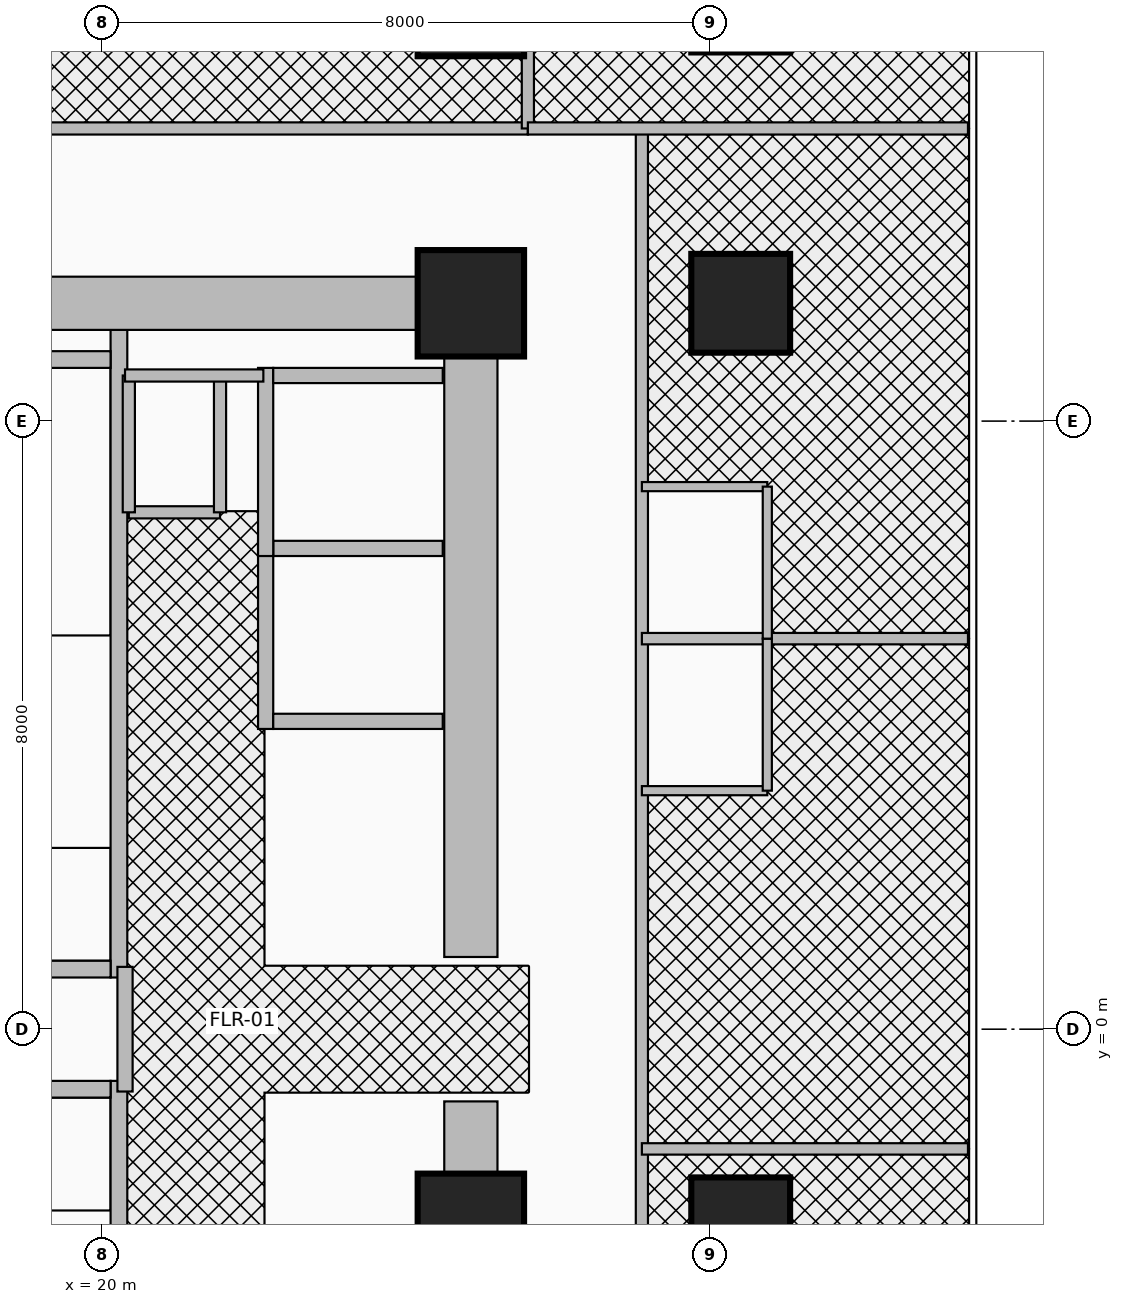
"""IFC4 building model, lengths in metres.
Left out: names, types, materials, properties, quantities, classifications, styles, units other than length and angle.
Written with IfcOpenShell. Run it as: python <this file> out.ifc"""

import sys

from ifc_helpers import new_model, si_unit, direction, frame, frame_2d, origin, origin_2d, place, context, subcontext, project, spatial, rectangle, circle, extrude, source, transform, mapped, element, fill, save


model = new_model("IFC4")
c1 = context("Model", 3, precision=1e-05, world=origin(), true_north=direction((0.0, 1.0)))
c2 = subcontext(c1, "Body", "Model", "MODEL_VIEW")
j1 = project(units=[si_unit("LENGTHUNIT", "METRE"), si_unit("PLANEANGLEUNIT", "RADIAN")], contexts=[c1])
p1 = place(None, origin())
s1 = spatial("IfcSite", under=j1, at=p1, CompositionType="ELEMENT")
p2 = place(p1, origin())
s2 = spatial("IfcBuilding", under=s1, at=p2, CompositionType="ELEMENT")
p3 = place(p2, frame((0.0, 0.0, 70.4)))
s3 = spatial("IfcBuildingStorey", under=s2, at=p3, CompositionType="ELEMENT", Elevation=70.4)
p4 = place(p3, frame((20.22, 0.68, 0.0), z_axis=(0.0, 0.0, 1.0), x_axis=(0.0, 1.0, 0.0)))
e1 = element("IfcWall", 1, at=p4, inside=s3, PredefinedType="SHEAR", context=c2, shape_type="SweptSolid", body=[
    extrude(rectangle(XDim=8.52, YDim=0.22, at=frame_2d((4.26, 0.0))), origin(), (0.0, 0.0, 1.0), 3.46),
])
p5 = place(p3, frame((17.0, 0.79, 0.0), z_axis=(0.0, 0.0, 1.0), x_axis=(1.0, 0.0, 0.0)))
e2 = element("IfcWall", 2, at=p5, inside=s3, PredefinedType="SHEAR", context=c2, shape_type="SweptSolid", body=[
    extrude(rectangle(XDim=3.11, YDim=0.22, at=frame_2d((1.555, 0.0))), origin(), (0.0, 0.0, 1.0), 3.46),
])
p6 = place(p5, frame((0.95, 0.0, 0.0)))
e3 = element("IfcOpeningElement", 3, at=p6, cuts=e2, PredefinedType="OPENING", context=c2, shape_type="SweptSolid", body=[
    extrude(rectangle(XDim=1.1, YDim=2.15, at=frame_2d((0.55, 1.075))), frame((0.0, 0.125, 0.0), z_axis=(0.0, -1.0, 0.0), x_axis=(1.0, 0.0, 0.0)), (0.0, 0.0, 1.0), 0.25),
])
p7 = place(p3, frame((17.0, 8.81, 0.0), z_axis=(0.0, 0.0, 1.0), x_axis=(1.0, 0.0, 0.0)))
e4 = element("IfcWall", 4, at=p7, inside=s3, PredefinedType="SHEAR", context=c2, shape_type="SweptSolid", body=[
    extrude(rectangle(XDim=3.11, YDim=0.22, at=frame_2d((1.555, 0.0))), origin(), (0.0, 0.0, 1.0), 3.46),
])
p8 = place(p3, frame((20.22, -9.2, 0.0), z_axis=(0.0, 0.0, 1.0), x_axis=(0.0, 1.0, 0.0)))
e5 = element("IfcWall", 5, at=p8, inside=s3, PredefinedType="SHEAR", context=c2, shape_type="SweptSolid", body=[
    extrude(rectangle(XDim=8.52, YDim=0.22, at=frame_2d((4.26, 0.0))), origin(), (0.0, 0.0, 1.0), 3.46),
])
p9 = place(p3, frame((17.0, -0.79, 0.0), z_axis=(0.0, 0.0, 1.0), x_axis=(1.0, 0.0, 0.0)))
e6 = element("IfcWall", 6, at=p9, inside=s3, PredefinedType="SHEAR", context=c2, shape_type="SweptSolid", body=[
    extrude(rectangle(XDim=3.11, YDim=0.22, at=frame_2d((1.555, 0.0))), origin(), (0.0, 0.0, 1.0), 3.46),
])
p10 = place(p9, frame((0.95, 0.0, 0.0)))
e7 = element("IfcOpeningElement", 7, at=p10, cuts=e6, PredefinedType="OPENING", context=c2, shape_type="SweptSolid", body=[
    extrude(rectangle(XDim=1.1, YDim=2.15, at=frame_2d((0.55, 1.075))), frame((0.0, 0.125, 0.0), z_axis=(0.0, -1.0, 0.0), x_axis=(1.0, 0.0, 0.0)), (0.0, 0.0, 1.0), 0.25),
])
for number, where, z_axis, x_axis in (
    (8, (24.85, -9.9, 0.0), (0.0, 0.0, 1.0), (0.0, 1.0, 0.0)),
    (9, (24.85, 0.95, 0.0), (0.0, 0.0, 1.0), (0.0, 1.0, 0.0)),
):
    element("IfcWall", number, at=place(p3, frame(where, z_axis=z_axis, x_axis=x_axis)), inside=s3, PredefinedType="SHEAR", context=c2, shape_type="SweptSolid", body=[
        extrude(rectangle(XDim=8.95, YDim=0.7, at=frame_2d((4.475, 0.0))), origin(), (0.0, 0.0, 1.0), 3.46),
    ])
p11 = place(p3, frame((15.85, 9.55, 0.0), z_axis=(0.0, 0.0, 1.0), x_axis=(1.0, 0.0, 0.0)))
e10 = element("IfcWall", 10, at=p11, inside=s3, PredefinedType="SHEAR", context=c2, shape_type="SweptSolid", body=[
    extrude(rectangle(XDim=9.0, YDim=0.7, at=frame_2d((4.5, 0.0))), origin(), (0.0, 0.0, 1.0), 3.46),
])
m1 = source(origin(), c2, "Body", "SweptSolid", [
    extrude(rectangle(XDim=1.4, YDim=1.4, at=origin_2d()), origin(), (0.0, 0.0, 1.0), 3.7),
])
p12 = place(p3, frame((24.85, -2.6, 0.0), z_axis=(0.0, 0.0, 1.0), x_axis=(1.0, 0.0, 0.0)))
e11 = element("IfcColumn", 11, at=p12, inside=s3, PredefinedType="COLUMN", context=c2, shape_type="MappedRepresentation", body=[
    mapped(m1, transform((0.0, 0.0, 0.0), x_axis=(1.0, 0.0, 0.0), y_axis=(0.0, 1.0, 0.0), z_axis=(0.0, 0.0, 1.0), scale=1.0)),
])
m2 = source(origin(), c2, "Body", "SweptSolid", [
    extrude(circle(Radius=0.65, at=origin_2d()), origin(), (0.0, 0.0, 1.0), 3.7),
])
p13 = place(p3, frame((28.4, -2.6, 0.0), z_axis=(0.0, 0.0, 1.0), x_axis=(1.0, 0.0, 0.0)))
e12 = element("IfcColumn", 12, at=p13, inside=s3, PredefinedType="COLUMN", context=c2, shape_type="MappedRepresentation", body=[
    mapped(m2, transform((0.0, 0.0, 0.0), x_axis=(1.0, 0.0, 0.0), y_axis=(0.0, 1.0, 0.0), z_axis=(0.0, 0.0, 1.0), scale=1.0)),
])
p14 = place(p3, frame((24.85, 9.55, 0.0), z_axis=(0.0, 0.0, 1.0), x_axis=(1.0, 0.0, 0.0)))
e13 = element("IfcColumn", 13, at=p14, inside=s3, PredefinedType="COLUMN", context=c2, shape_type="MappedRepresentation", body=[
    mapped(m1, transform((0.0, 0.0, 0.0), x_axis=(1.0, 0.0, 0.0), y_axis=(0.0, 1.0, 0.0), z_axis=(0.0, 0.0, 1.0), scale=1.0)),
])
p15 = place(p3, frame((28.4, 9.55, 0.0), z_axis=(0.0, 0.0, 1.0), x_axis=(1.0, 0.0, 0.0)))
e14 = element("IfcColumn", 14, at=p15, inside=s3, PredefinedType="COLUMN", context=c2, shape_type="MappedRepresentation", body=[
    mapped(m2, transform((0.0, 0.0, 0.0), x_axis=(1.0, 0.0, 0.0), y_axis=(0.0, 1.0, 0.0), z_axis=(0.0, 0.0, 1.0), scale=1.0)),
])
p16 = place(p3, frame((24.85, 13.5, 0.0), z_axis=(0.0, 0.0, 1.0), x_axis=(1.0, 0.0, 0.0)))
e15 = element("IfcColumn", 15, at=p16, inside=s3, PredefinedType="COLUMN", context=c2, shape_type="MappedRepresentation", body=[
    mapped(m1, transform((0.0, 0.0, 0.0), x_axis=(1.0, 0.0, 0.0), y_axis=(0.0, 1.0, 0.0), z_axis=(0.0, 0.0, 1.0), scale=1.0)),
])
p17 = place(p3, frame((22.15, 3.95, 0.0), z_axis=(0.0, 0.0, 1.0), x_axis=(0.0, 1.0, 0.0)))
e16 = element("IfcWall", 16, at=p17, inside=s3, PredefinedType="MOVABLE", context=c2, shape_type="SweptSolid", body=[
    extrude(rectangle(XDim=2.475, YDim=0.2, at=frame_2d((1.238, 0.0))), origin(), (0.0, 0.0, 1.0), 3.46),
])
for number, where, z_axis, x_axis in (
    (17, (22.25, 4.05, 0.0), (0.0, 0.0, 1.0), (1.0, 0.0, 0.0)),
    (18, (22.25, 6.325, 0.0), (0.0, 0.0, 1.0), (1.0, 0.0, 0.0)),
):
    element("IfcWall", number, at=place(p3, frame(where, z_axis=z_axis, x_axis=x_axis)), inside=s3, PredefinedType="MOVABLE", context=c2, shape_type="SweptSolid", body=[
        extrude(rectangle(XDim=2.23, YDim=0.2, at=frame_2d((1.115, 0.0))), origin(), (0.0, 0.0, 1.0), 2.245),
    ])
p18 = place(p3, frame((22.15, 6.225, 0.0), z_axis=(0.0, 0.0, 1.0), x_axis=(0.0, 1.0, 0.0)))
e19 = element("IfcWall", 19, at=p18, inside=s3, PredefinedType="MOVABLE", context=c2, shape_type="SweptSolid", body=[
    extrude(rectangle(XDim=2.475, YDim=0.2, at=frame_2d((1.237, 0.0))), origin(), (0.0, 0.0, 1.0), 3.46),
])
p19 = place(p3, frame((22.25, 8.6, 0.0), z_axis=(0.0, 0.0, 1.0), x_axis=(1.0, 0.0, 0.0)))
e20 = element("IfcWall", 20, at=p19, inside=s3, PredefinedType="MOVABLE", context=c2, shape_type="SweptSolid", body=[
    extrude(rectangle(XDim=2.23, YDim=0.2, at=frame_2d((1.115, 0.0))), origin(), (0.0, 0.0, 1.0), 2.245),
])
p20 = place(p3, frame((20.3, -0.82, 0.0), z_axis=(0.0, 0.0, 1.0), x_axis=(0.0, 1.0, 0.0)))
e21 = element("IfcWall", 21, at=p20, inside=s3, PredefinedType="PARTITIONING", context=c2, shape_type="SweptSolid", body=[
    extrude(rectangle(XDim=1.64, YDim=0.2, at=frame_2d((0.82, 0.0))), origin(), (0.0, 0.0, 1.0), 3.46),
])
p21 = place(p20, frame((0.295, 0.0, 0.0)))
e22 = element("IfcOpeningElement", 22, at=p21, cuts=e21, PredefinedType="OPENING", context=c2, shape_type="SweptSolid", body=[
    extrude(rectangle(XDim=1.05, YDim=2.15, at=frame_2d((0.525, 1.075))), frame((0.0, 0.115, 0.0), z_axis=(0.0, -1.0, 0.0), x_axis=(1.0, 0.0, 0.0)), (0.0, 0.0, 1.0), 0.23),
])
p22 = place(p3, frame((20.35, 6.8, 0.0), z_axis=(0.0, 0.0, 1.0), x_axis=(1.0, 0.0, 0.0)))
e23 = element("IfcWall", 23, at=p22, inside=s3, PredefinedType="PARTITIONING", context=c2, shape_type="SweptSolid", body=[
    extrude(rectangle(XDim=1.2, YDim=0.16, at=frame_2d((0.6, 0.0))), origin(), (0.0, 0.0, 1.0), 3.46),
])
p23 = place(p22, frame((0.175, 0.0, 0.0)))
e24 = element("IfcOpeningElement", 24, at=p23, cuts=e23, PredefinedType="OPENING", context=c2, shape_type="SweptSolid", body=[
    extrude(rectangle(XDim=0.85, YDim=2.05, at=frame_2d((0.425, 1.025))), frame((0.0, 0.095, 0.0), z_axis=(0.0, -1.0, 0.0), x_axis=(1.0, 0.0, 0.0)), (0.0, 0.0, 1.0), 0.19),
])
for number, where, z_axis, x_axis in (
    (25, (21.55, 6.8, 0.0), (0.0, 0.0, 1.0), (0.0, 1.0, 0.0)),
    (26, (20.35, 6.8, 0.0), (0.0, 0.0, 1.0), (0.0, 1.0, 0.0)),
):
    element("IfcWall", number, at=place(p3, frame(where, z_axis=z_axis, x_axis=x_axis)), inside=s3, PredefinedType="PARTITIONING", context=c2, shape_type="SweptSolid", body=[
        extrude(rectangle(XDim=1.8, YDim=0.16, at=frame_2d((0.9, 0.0))), origin(), (0.0, 0.0, 1.0), 3.46),
    ])
p24 = place(p3, frame((20.3, 8.6, 0.0), z_axis=(0.0, 0.0, 1.0), x_axis=(1.0, 0.0, 0.0)))
e27 = element("IfcWall", 27, at=p24, inside=s3, PredefinedType="PARTITIONING", context=c2, shape_type="SweptSolid", body=[
    extrude(rectangle(XDim=1.82, YDim=0.16, at=frame_2d((0.91, 0.0))), origin(), (0.0, 0.0, 1.0), 3.46),
])
p25 = place(p3, frame((15.4, 11.85, 0.0), z_axis=(0.0, 0.0, 1.0), x_axis=(1.0, 0.0, 0.0)))
e28 = element("IfcWall", 28, at=p25, inside=s3, PredefinedType="PARTITIONING", context=c2, shape_type="SweptSolid", body=[
    extrude(rectangle(XDim=10.2, YDim=0.16, at=frame_2d((5.1, 0.0))), origin(), (0.0, 0.0, 1.0), 2.834),
])
p26 = place(p25, frame((4.65, 0.0, 0.0)))
e29 = element("IfcOpeningElement", 29, at=p26, cuts=e28, PredefinedType="OPENING", context=c2, shape_type="SweptSolid", body=[
    extrude(rectangle(XDim=0.9, YDim=2.1, at=frame_2d((0.45, 1.05))), frame((0.0, 0.095, 0.0), z_axis=(0.0, -1.0, 0.0), x_axis=(1.0, 0.0, 0.0)), (0.0, 0.0, 1.0), 0.19),
])
p27 = place(p3, frame((25.6, 11.85, 0.0), z_axis=(0.0, 0.0, 1.0), x_axis=(0.0, 1.0, 0.0)))
e30 = element("IfcWall", 30, at=p27, inside=s3, PredefinedType="PARTITIONING", context=c2, shape_type="SweptSolid", body=[
    extrude(rectangle(XDim=5.898, YDim=0.16, at=frame_2d((2.949, 0.0))), origin(), (0.0, 0.0, 1.0), 2.583),
])
p28 = place(p3, frame((27.1, -13.89, 0.0), z_axis=(0.0, 0.0, 1.0), x_axis=(0.0, 1.0, 0.0)))
e31 = element("IfcWall", 31, at=p28, inside=s3, PredefinedType="PARTITIONING", context=c2, shape_type="SweptSolid", body=[
    extrude(rectangle(XDim=25.74, YDim=0.16, at=frame_2d((12.87, 0.0))), origin(), (0.0, 0.0, 1.0), 2.583),
])
p29 = place(p28, frame((2.62, 0.0, 0.0)))
e32 = element("IfcOpeningElement", 32, at=p29, cuts=e31, PredefinedType="OPENING", context=c2, shape_type="SweptSolid", body=[
    extrude(rectangle(XDim=0.95, YDim=2.15, at=frame_2d((0.475, 1.075))), frame((0.0, 0.095, 0.0), z_axis=(0.0, -1.0, 0.0), x_axis=(1.0, 0.0, 0.0)), (0.0, 0.0, 1.0), 0.19),
])
p30 = place(p28, frame((8.484, 0.0, 0.0)))
e33 = element("IfcOpeningElement", 33, at=p30, cuts=e31, PredefinedType="OPENING", context=c2, shape_type="SweptSolid", body=[
    extrude(rectangle(XDim=0.95, YDim=2.15, at=frame_2d((0.475, 1.075))), frame((0.0, 0.095, 0.0), z_axis=(0.0, -1.0, 0.0), x_axis=(1.0, 0.0, 0.0)), (0.0, 0.0, 1.0), 0.19),
])
p31 = place(p28, frame((14.197, 0.0, 0.0)))
e34 = element("IfcOpeningElement", 34, at=p31, cuts=e31, PredefinedType="OPENING", context=c2, shape_type="SweptSolid", body=[
    extrude(rectangle(XDim=0.95, YDim=2.15, at=frame_2d((0.475, 1.075))), frame((0.0, 0.095, 0.0), z_axis=(0.0, -1.0, 0.0), x_axis=(1.0, 0.0, 0.0)), (0.0, 0.0, 1.0), 0.19),
])
p32 = place(p28, frame((21.648, 0.0, 0.0)))
e35 = element("IfcOpeningElement", 35, at=p32, cuts=e31, PredefinedType="OPENING", context=c2, shape_type="SweptSolid", body=[
    extrude(rectangle(XDim=0.95, YDim=2.15, at=frame_2d((0.475, 1.075))), frame((0.0, 0.095, 0.0), z_axis=(0.0, -1.0, 0.0), x_axis=(1.0, 0.0, 0.0)), (0.0, 0.0, 1.0), 0.19),
])
p33 = place(p3, frame((25.6, 11.85, 0.0), z_axis=(0.0, 0.0, 1.0), x_axis=(1.0, 0.0, 0.0)))
e36 = element("IfcWall", 36, at=p33, inside=s3, PredefinedType="PARTITIONING", context=c2, shape_type="SweptSolid", body=[
    extrude(rectangle(XDim=5.79, YDim=0.16, at=frame_2d((2.895, 0.0))), origin(), (0.0, 0.0, 1.0), 2.896),
])
p34 = place(p33, frame((0.3, 0.0, 0.0)))
e37 = element("IfcOpeningElement", 37, at=p34, cuts=e36, PredefinedType="OPENING", context=c2, shape_type="SweptSolid", body=[
    extrude(rectangle(XDim=0.9, YDim=2.1, at=frame_2d((0.45, 1.05))), frame((0.0, 0.095, 0.0), z_axis=(0.0, -1.0, 0.0), x_axis=(1.0, 0.0, 0.0)), (0.0, 0.0, 1.0), 0.19),
])
for number, where, z_axis, x_axis in (
    (38, (27.1, -1.575, 0.0), (0.0, 0.0, 1.0), (1.0, 0.0, 0.0)),
    (39, (27.1, 5.138, 0.0), (0.0, 0.0, 1.0), (1.0, 0.0, 0.0)),
):
    element("IfcWall", number, at=place(p3, frame(where, z_axis=z_axis, x_axis=x_axis)), inside=s3, PredefinedType="PARTITIONING", context=c2, shape_type="SweptSolid", body=[
        extrude(rectangle(XDim=4.29, YDim=0.15, at=frame_2d((2.145, 0.0))), origin(), (0.0, 0.0, 1.0), 2.896),
    ])
p35 = place(p3, frame((27.1, 3.138, 0.0), z_axis=(0.0, 0.0, 1.0), x_axis=(1.0, 0.0, 0.0)))
e40 = element("IfcWall", 40, at=p35, inside=s3, PredefinedType="PARTITIONING", context=c2, shape_type="SweptSolid", body=[
    extrude(rectangle(XDim=1.65, YDim=0.12, at=frame_2d((0.825, 0.0))), origin(), (0.0, 0.0, 1.0), 2.896),
])
p36 = place(p3, frame((28.75, 3.138, 0.0), z_axis=(0.0, 0.0, 1.0), x_axis=(0.0, 1.0, 0.0)))
e41 = element("IfcWall", 41, at=p36, inside=s3, PredefinedType="PARTITIONING", context=c2, shape_type="SweptSolid", body=[
    extrude(rectangle(XDim=2.0, YDim=0.12, at=frame_2d((1.0, 0.0))), origin(), (0.0, 0.0, 1.0), 3.46),
])
p37 = place(p36, frame((0.575, 0.0, 0.0)))
e42 = element("IfcOpeningElement", 42, at=p37, cuts=e41, PredefinedType="OPENING", context=c2, shape_type="SweptSolid", body=[
    extrude(rectangle(XDim=0.85, YDim=2.1, at=frame_2d((0.425, 1.05))), frame((0.0, 0.075, 0.0), z_axis=(0.0, -1.0, 0.0), x_axis=(1.0, 0.0, 0.0)), (0.0, 0.0, 1.0), 0.15),
])
p38 = place(p3, frame((27.1, 7.138, 0.0), z_axis=(0.0, 0.0, 1.0), x_axis=(1.0, 0.0, 0.0)))
e43 = element("IfcWall", 43, at=p38, inside=s3, PredefinedType="PARTITIONING", context=c2, shape_type="SweptSolid", body=[
    extrude(rectangle(XDim=1.65, YDim=0.12, at=frame_2d((0.825, 0.0))), origin(), (0.0, 0.0, 1.0), 2.896),
])
p39 = place(p3, frame((28.75, 5.138, 0.0), z_axis=(0.0, 0.0, 1.0), x_axis=(0.0, 1.0, 0.0)))
e44 = element("IfcWall", 44, at=p39, inside=s3, PredefinedType="PARTITIONING", context=c2, shape_type="SweptSolid", body=[
    extrude(rectangle(XDim=2.0, YDim=0.12, at=frame_2d((1.0, 0.0))), origin(), (0.0, 0.0, 1.0), 3.46),
])
p40 = place(p39, frame((0.575, 0.0, 0.0)))
e45 = element("IfcOpeningElement", 45, at=p40, cuts=e44, PredefinedType="OPENING", context=c2, shape_type="SweptSolid", body=[
    extrude(rectangle(XDim=0.85, YDim=2.1, at=frame_2d((0.425, 1.05))), frame((0.0, 0.075, 0.0), z_axis=(0.0, -1.0, 0.0), x_axis=(1.0, 0.0, 0.0)), (0.0, 0.0, 1.0), 0.15),
])
p41 = place(p21, origin())
e46 = element("IfcDoor", 46, at=p41, inside=s3, OperationType="SINGLE_SWING_RIGHT", PredefinedType="DOOR", context=c2, shape_type="SweptSolid", body=[
    extrude(rectangle(XDim=1.05, YDim=2.15, at=frame_2d((0.525, 1.075))), frame((0.0, 0.025, 0.0), z_axis=(0.0, -1.0, 0.0), x_axis=(1.0, 0.0, 0.0)), (0.0, 0.0, 1.0), 0.05),
])
fill(e22, e46)
p42 = place(p23, origin())
e47 = element("IfcDoor", 47, at=p42, inside=s3, OperationType="SINGLE_SWING_LEFT", PredefinedType="DOOR", context=c2, shape_type="SweptSolid", body=[
    extrude(rectangle(XDim=0.85, YDim=2.05, at=frame_2d((0.425, 1.025))), frame((0.0, 0.025, 0.0), z_axis=(0.0, -1.0, 0.0), x_axis=(1.0, 0.0, 0.0)), (0.0, 0.0, 1.0), 0.05),
])
fill(e24, e47)
p43 = place(p26, frame((0.9, 0.0, 0.0), z_axis=(0.0, 0.0, 1.0), x_axis=(-1.0, 0.0, 0.0)))
e48 = element("IfcDoor", 48, at=p43, inside=s3, OperationType="SINGLE_SWING_LEFT", PredefinedType="DOOR", context=c2, shape_type="SweptSolid", body=[
    extrude(rectangle(XDim=0.9, YDim=2.1, at=frame_2d((0.45, 1.05))), frame((0.0, 0.025, 0.0), z_axis=(0.0, -1.0, 0.0), x_axis=(1.0, 0.0, 0.0)), (0.0, 0.0, 1.0), 0.05),
])
fill(e29, e48)
p44 = place(p34, origin())
e49 = element("IfcDoor", 49, at=p44, inside=s3, OperationType="SINGLE_SWING_LEFT", PredefinedType="DOOR", context=c2, shape_type="SweptSolid", body=[
    extrude(rectangle(XDim=0.9, YDim=2.1, at=frame_2d((0.45, 1.05))), frame((0.0, 0.025, 0.0), z_axis=(0.0, -1.0, 0.0), x_axis=(1.0, 0.0, 0.0)), (0.0, 0.0, 1.0), 0.05),
])
fill(e37, e49)
p45 = place(p31, origin())
e50 = element("IfcDoor", 50, at=p45, inside=s3, OperationType="SINGLE_SWING_RIGHT", PredefinedType="DOOR", context=c2, shape_type="SweptSolid", body=[
    extrude(rectangle(XDim=0.95, YDim=2.15, at=frame_2d((0.475, 1.075))), frame((0.0, 0.025, 0.0), z_axis=(0.0, -1.0, 0.0), x_axis=(1.0, 0.0, 0.0)), (0.0, 0.0, 1.0), 0.05),
])
fill(e34, e50)
p46 = place(p37, origin())
e51 = element("IfcDoor", 51, at=p46, inside=s3, OperationType="SINGLE_SWING_LEFT", PredefinedType="DOOR", context=c2, shape_type="SweptSolid", body=[
    extrude(rectangle(XDim=0.85, YDim=2.1, at=frame_2d((0.425, 1.05))), frame((0.0, 0.025, 0.0), z_axis=(0.0, -1.0, 0.0), x_axis=(1.0, 0.0, 0.0)), (0.0, 0.0, 1.0), 0.05),
])
fill(e42, e51)
p47 = place(p32, origin())
e52 = element("IfcDoor", 52, at=p47, inside=s3, OperationType="SINGLE_SWING_RIGHT", PredefinedType="DOOR", context=c2, shape_type="SweptSolid", body=[
    extrude(rectangle(XDim=0.95, YDim=2.15, at=frame_2d((0.475, 1.075))), frame((0.0, 0.025, 0.0), z_axis=(0.0, -1.0, 0.0), x_axis=(1.0, 0.0, 0.0)), (0.0, 0.0, 1.0), 0.05),
])
fill(e35, e52)
p48 = place(p40, origin())
e53 = element("IfcDoor", 53, at=p48, inside=s3, OperationType="SINGLE_SWING_LEFT", PredefinedType="DOOR", context=c2, shape_type="SweptSolid", body=[
    extrude(rectangle(XDim=0.85, YDim=2.1, at=frame_2d((0.425, 1.05))), frame((0.0, 0.025, 0.0), z_axis=(0.0, -1.0, 0.0), x_axis=(1.0, 0.0, 0.0)), (0.0, 0.0, 1.0), 0.05),
])
fill(e45, e53)
save(model, sys.argv[1])
